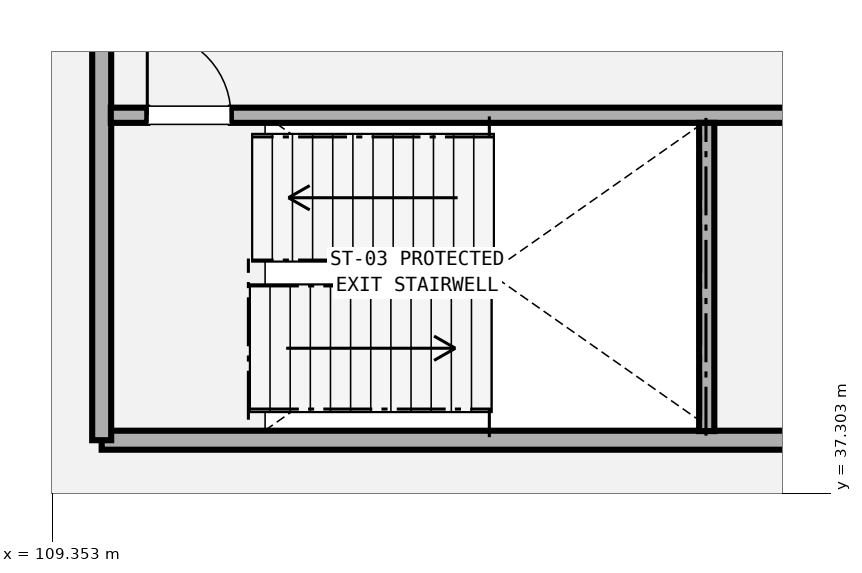
"""IFC4 building model, lengths in metres.
Left out: names, types, materials, properties, quantities, classifications, styles, units other than length and angle.
Written with IfcOpenShell. Run it as: python <this file> out.ifc"""

import sys

from ifc_helpers import new_model, si_unit, direction, frame, frame_2d, origin, place, context, subcontext, project, spatial, rectangle, extrude, element, fill, save


model = new_model("IFC4")
c1 = context("Model", 3, precision=1e-05, world=origin(), true_north=direction((0.0, 1.0)))
c2 = subcontext(c1, "Body", "Model", "MODEL_VIEW")
j1 = project(units=[si_unit("LENGTHUNIT", "METRE"), si_unit("PLANEANGLEUNIT", "RADIAN")], contexts=[c1])
p1 = place(None, origin())
s1 = spatial("IfcSite", under=j1, at=p1, CompositionType="ELEMENT")
p2 = place(p1, origin())
s2 = spatial("IfcBuilding", under=s1, at=p2, CompositionType="ELEMENT")
p3 = place(p2, frame((0.0, 0.0, 5.4)))
s3 = spatial("IfcBuildingStorey", under=s2, at=p3, CompositionType="ELEMENT", Elevation=5.4)
p4 = place(p3, frame((110.0, 38.0, 0.0), z_axis=(0.0, 0.0, 1.0), x_axis=(1.0, 0.0, 0.0)))
e1 = element("IfcWall", 1, at=p4, inside=s3, PredefinedType="SHEAR", context=c2, shape_type="SweptSolid", body=[
    extrude(rectangle(XDim=10.8, YDim=0.25, at=frame_2d((5.4, 0.0))), origin(), (0.0, 0.0, 1.0), 3.88),
])
p5 = place(p3, frame((110.0, 38.0, 0.0), z_axis=(0.0, 0.0, 1.0), x_axis=(0.0, 1.0, 0.0)))
e2 = element("IfcWall", 2, at=p5, inside=s3, PredefinedType="SHEAR", context=c2, shape_type="SweptSolid", body=[
    extrude(rectangle(XDim=8.6, YDim=0.25, at=frame_2d((4.3, 0.0))), origin(), (0.0, 0.0, 1.0), 3.88),
])
p6 = place(p3, frame((110.12, 42.275, 0.0), z_axis=(0.0, 0.0, 1.0), x_axis=(1.0, 0.0, 0.0)))
e3 = element("IfcWall", 3, at=p6, inside=s3, PredefinedType="SHEAR", context=c2, shape_type="SweptSolid", body=[
    extrude(rectangle(XDim=10.56, YDim=0.2, at=frame_2d((5.28, 0.0))), origin(), (0.0, 0.0, 1.0), 3.88),
])
p7 = place(p6, frame((0.48, 0.0, 0.0)))
e4 = element("IfcOpeningElement", 4, at=p7, cuts=e3, PredefinedType="OPENING", context=c2, shape_type="SweptSolid", body=[
    extrude(rectangle(XDim=1.1, YDim=2.2, at=frame_2d((0.55, 1.1))), frame((0.0, 0.11, 0.0), z_axis=(0.0, -1.0, 0.0), x_axis=(1.0, 0.0, 0.0)), (0.0, 0.0, 1.0), 0.22),
])
p8 = place(p3, frame((117.96, 38.12, 0.0), z_axis=(0.0, 0.0, 1.0), x_axis=(0.0, 1.0, 0.0)))
e5 = element("IfcWall", 5, at=p8, inside=s3, PredefinedType="SHEAR", context=c2, shape_type="SweptSolid", body=[
    extrude(rectangle(XDim=4.055, YDim=0.2, at=frame_2d((2.027, 0.0))), origin(), (0.0, 0.0, 1.0), 3.88),
])
p9 = place(p7, origin())
e6 = element("IfcDoor", 6, at=p9, inside=s3, OperationType="SINGLE_SWING_LEFT", PredefinedType="DOOR", context=c2, shape_type="SweptSolid", body=[
    extrude(rectangle(XDim=1.1, YDim=2.2, at=frame_2d((0.55, 1.1))), frame((0.0, 0.025, 0.0), z_axis=(0.0, -1.0, 0.0), x_axis=(1.0, 0.0, 0.0)), (0.0, 0.0, 1.0), 0.05),
])
fill(e4, e6)
save(model, sys.argv[1])
